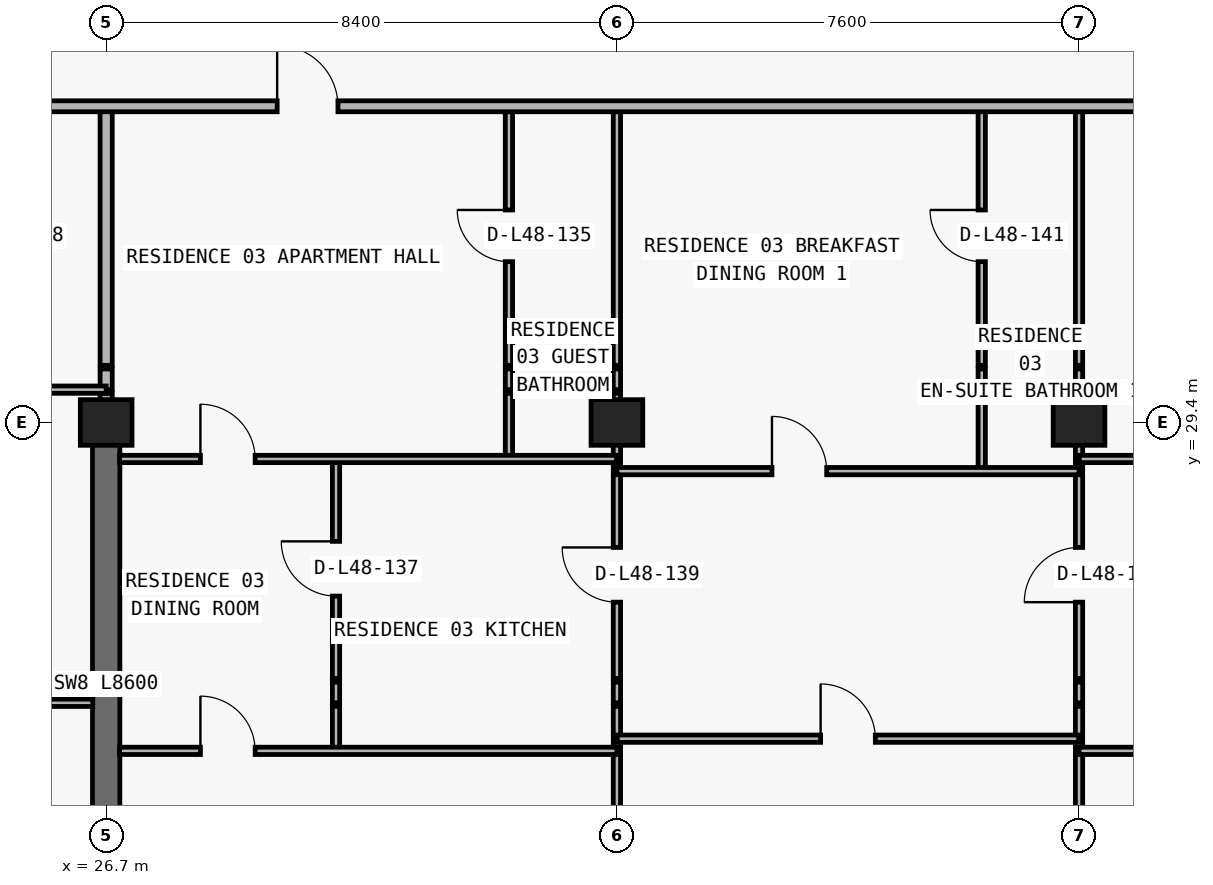
"""IFC4 building model, lengths in metres.
Left out: names, types, materials, properties, quantities, classifications, styles, units other than length and angle.
Written with IfcOpenShell. Run it as: python <this file> out.ifc"""

import sys

from ifc_helpers import new_model, si_unit, direction, frame, frame_2d, origin, origin_2d, place, context, subcontext, project, spatial, rectangle, extrude, element, fill, save


model = new_model("IFC4")
c1 = context("Model", 3, precision=1e-05, world=origin(), true_north=direction((0.0, 1.0)))
c2 = subcontext(c1, "Body", "Model", "MODEL_VIEW")
j1 = project(units=[si_unit("LENGTHUNIT", "METRE"), si_unit("PLANEANGLEUNIT", "RADIAN")], contexts=[c1])
p1 = place(None, origin())
s1 = spatial("IfcSite", under=j1, at=p1, CompositionType="ELEMENT")
p2 = place(p1, origin())
s2 = spatial("IfcBuilding", under=s1, at=p2, CompositionType="ELEMENT")
p3 = place(p2, frame((0.0, 0.0, 173.7)))
s3 = spatial("IfcBuildingStorey", under=s2, at=p3, CompositionType="ELEMENT", Elevation=173.7)
for number, where, z_axis, x_axis in (
    (1, (26.7, 29.4, 0.0), (0.0, 0.0, 1.0), (1.0, 0.0, 0.0)),
    (2, (35.1, 29.4, 0.0), (0.0, 0.0, 1.0), (1.0, 0.0, 0.0)),
    (3, (42.7, 29.4, 0.0), (0.0, 0.0, 1.0), (1.0, 0.0, 0.0)),
):
    element("IfcColumn", number, at=place(p3, frame(where, z_axis=z_axis, x_axis=x_axis)), inside=s3, PredefinedType="COLUMN", context=c2, shape_type="SweptSolid", body=[
        extrude(rectangle(XDim=0.85, YDim=0.75, at=origin_2d()), origin(), (0.0, 0.0, 1.0), 3.05),
    ])
p4 = place(p3, frame((26.7, 20.8, 0.0), z_axis=(0.0, 0.0, 1.0), x_axis=(0.0, 1.0, 0.0)))
e4 = element("IfcWall", 4, at=p4, inside=s3, PredefinedType="SHEAR", context=c2, shape_type="SweptSolid", body=[
    extrude(rectangle(XDim=8.6, YDim=0.45, at=frame_2d((4.3, 0.0))), origin(), (0.0, 0.0, 1.0), 3.05),
])
p5 = place(p3, frame((26.7, 29.405, 0.0), z_axis=(0.0, 0.0, 1.0), x_axis=(0.0, 1.0, 0.0)))
e5 = element("IfcWall", 5, at=p5, inside=s3, PredefinedType="PARTITIONING", context=c2, shape_type="SweptSolid", body=[
    extrude(rectangle(XDim=0.475, YDim=0.2, at=frame_2d((0.237, 0.0))), origin(), (0.0, 0.0, 1.0), 2.335),
])
p6 = place(p3, frame((26.7, 29.94, 0.0), z_axis=(0.0, 0.0, 1.0), x_axis=(0.0, 1.0, 0.0)))
e6 = element("IfcWall", 6, at=p6, inside=s3, PredefinedType="PARTITIONING", context=c2, shape_type="SweptSolid", body=[
    extrude(rectangle(XDim=0.34, YDim=0.2, at=frame_2d((0.17, 0.0))), origin(), (0.0, 0.0, 1.0), 2.335),
])
p7 = place(p3, frame((26.7, 30.34, 0.0), z_axis=(0.0, 0.0, 1.0), x_axis=(0.0, 1.0, 0.0)))
e7 = element("IfcWall", 7, at=p7, inside=s3, PredefinedType="PARTITIONING", context=c2, shape_type="SweptSolid", body=[
    extrude(rectangle(XDim=4.26, YDim=0.2, at=frame_2d((2.13, 0.0))), origin(), (0.0, 0.0, 1.0), 2.335),
])
p8 = place(p3, frame((30.48, 24.0, 0.0), z_axis=(0.0, 0.0, 1.0), x_axis=(0.0, 1.0, 0.0)))
e8 = element("IfcWall", 8, at=p8, inside=s3, PredefinedType="PARTITIONING", context=c2, shape_type="SweptSolid", body=[
    extrude(rectangle(XDim=0.73, YDim=0.12, at=frame_2d((0.365, 0.0))), origin(), (0.0, 0.0, 1.0), 3.05),
])
p9 = place(p3, frame((30.48, 24.79, 0.0), z_axis=(0.0, 0.0, 1.0), x_axis=(0.0, 1.0, 0.0)))
e9 = element("IfcWall", 9, at=p9, inside=s3, PredefinedType="PARTITIONING", context=c2, shape_type="SweptSolid", body=[
    extrude(rectangle(XDim=0.34, YDim=0.12, at=frame_2d((0.17, 0.0))), origin(), (0.0, 0.0, 1.0), 3.05),
])
p10 = place(p3, frame((30.48, 25.19, 0.0), z_axis=(0.0, 0.0, 1.0), x_axis=(0.0, 1.0, 0.0)))
e10 = element("IfcWall", 10, at=p10, inside=s3, PredefinedType="PARTITIONING", context=c2, shape_type="SweptSolid", body=[
    extrude(rectangle(XDim=3.61, YDim=0.12, at=frame_2d((1.805, 0.0))), origin(), (0.0, 0.0, 1.0), 3.05),
])
p11 = place(p10, frame((1.355, 0.0, 0.0)))
e11 = element("IfcOpeningElement", 11, at=p11, cuts=e10, PredefinedType="OPENING", context=c2, shape_type="SweptSolid", body=[
    extrude(rectangle(XDim=0.9, YDim=2.15, at=frame_2d((0.45, 1.075))), frame((0.0, 0.07, 0.0), z_axis=(0.0, -1.0, 0.0), x_axis=(1.0, 0.0, 0.0)), (0.0, 0.0, 1.0), 0.14),
])
p12 = place(p3, frame((33.324, 28.8, 0.0), z_axis=(0.0, 0.0, 1.0), x_axis=(0.0, 1.0, 0.0)))
e12 = element("IfcWall", 12, at=p12, inside=s3, PredefinedType="PARTITIONING", context=c2, shape_type="SweptSolid", body=[
    extrude(rectangle(XDim=1.08, YDim=0.12, at=frame_2d((0.54, 0.0))), origin(), (0.0, 0.0, 1.0), 3.05),
])
p13 = place(p3, frame((33.324, 29.94, 0.0), z_axis=(0.0, 0.0, 1.0), x_axis=(0.0, 1.0, 0.0)))
e13 = element("IfcWall", 13, at=p13, inside=s3, PredefinedType="PARTITIONING", context=c2, shape_type="SweptSolid", body=[
    extrude(rectangle(XDim=0.34, YDim=0.12, at=frame_2d((0.17, 0.0))), origin(), (0.0, 0.0, 1.0), 3.05),
])
p14 = place(p3, frame((33.324, 30.34, 0.0), z_axis=(0.0, 0.0, 1.0), x_axis=(0.0, 1.0, 0.0)))
e14 = element("IfcWall", 14, at=p14, inside=s3, PredefinedType="PARTITIONING", context=c2, shape_type="SweptSolid", body=[
    extrude(rectangle(XDim=4.26, YDim=0.12, at=frame_2d((2.13, 0.0))), origin(), (0.0, 0.0, 1.0), 3.05),
])
p15 = place(p14, frame((1.705, 0.0, 0.0)))
e15 = element("IfcOpeningElement", 15, at=p15, cuts=e14, PredefinedType="OPENING", context=c2, shape_type="SweptSolid", body=[
    extrude(rectangle(XDim=0.85, YDim=2.1, at=frame_2d((0.425, 1.05))), frame((0.0, 0.07, 0.0), z_axis=(0.0, -1.0, 0.0), x_axis=(1.0, 0.0, 0.0)), (0.0, 0.0, 1.0), 0.14),
])
p16 = place(p3, frame((35.1, 11.24, 0.0), z_axis=(0.0, 0.0, 1.0), x_axis=(0.0, 1.0, 0.0)))
e16 = element("IfcWall", 16, at=p16, inside=s3, PredefinedType="PARTITIONING", context=c2, shape_type="SweptSolid", body=[
    extrude(rectangle(XDim=13.49, YDim=0.12, at=frame_2d((6.745, 0.0))), origin(), (0.0, 0.0, 1.0), 2.263),
])
p17 = place(p3, frame((35.1, 24.79, 0.0), z_axis=(0.0, 0.0, 1.0), x_axis=(0.0, 1.0, 0.0)))
e17 = element("IfcWall", 17, at=p17, inside=s3, PredefinedType="PARTITIONING", context=c2, shape_type="SweptSolid", body=[
    extrude(rectangle(XDim=0.34, YDim=0.12, at=frame_2d((0.17, 0.0))), origin(), (0.0, 0.0, 1.0), 2.263),
])
p18 = place(p3, frame((35.1, 25.19, 0.0), z_axis=(0.0, 0.0, 1.0), x_axis=(0.0, 1.0, 0.0)))
e18 = element("IfcWall", 18, at=p18, inside=s3, PredefinedType="PARTITIONING", context=c2, shape_type="SweptSolid", body=[
    extrude(rectangle(XDim=4.69, YDim=0.12, at=frame_2d((2.345, 0.0))), origin(), (0.0, 0.0, 1.0), 2.263),
])
p19 = place(p18, frame((1.255, 0.0, 0.0)))
e19 = element("IfcOpeningElement", 19, at=p19, cuts=e18, PredefinedType="OPENING", context=c2, shape_type="SweptSolid", body=[
    extrude(rectangle(XDim=0.9, YDim=2.15, at=frame_2d((0.45, 1.075))), frame((0.0, 0.07, 0.0), z_axis=(0.0, -1.0, 0.0), x_axis=(1.0, 0.0, 0.0)), (0.0, 0.0, 1.0), 0.14),
])
p20 = place(p3, frame((35.1, 29.94, 0.0), z_axis=(0.0, 0.0, 1.0), x_axis=(0.0, 1.0, 0.0)))
e20 = element("IfcWall", 20, at=p20, inside=s3, PredefinedType="PARTITIONING", context=c2, shape_type="SweptSolid", body=[
    extrude(rectangle(XDim=0.34, YDim=0.12, at=frame_2d((0.17, 0.0))), origin(), (0.0, 0.0, 1.0), 2.263),
])
p21 = place(p3, frame((35.1, 30.34, 0.0), z_axis=(0.0, 0.0, 1.0), x_axis=(0.0, 1.0, 0.0)))
e21 = element("IfcWall", 21, at=p21, inside=s3, PredefinedType="PARTITIONING", context=c2, shape_type="SweptSolid", body=[
    extrude(rectangle(XDim=4.26, YDim=0.12, at=frame_2d((2.13, 0.0))), origin(), (0.0, 0.0, 1.0), 2.263),
])
p22 = place(p3, frame((41.1, 28.6, 0.0), z_axis=(0.0, 0.0, 1.0), x_axis=(0.0, 1.0, 0.0)))
e22 = element("IfcWall", 22, at=p22, inside=s3, PredefinedType="PARTITIONING", context=c2, shape_type="SweptSolid", body=[
    extrude(rectangle(XDim=1.28, YDim=0.12, at=frame_2d((0.64, 0.0))), origin(), (0.0, 0.0, 1.0), 3.05),
])
p23 = place(p3, frame((41.1, 29.94, 0.0), z_axis=(0.0, 0.0, 1.0), x_axis=(0.0, 1.0, 0.0)))
e23 = element("IfcWall", 23, at=p23, inside=s3, PredefinedType="PARTITIONING", context=c2, shape_type="SweptSolid", body=[
    extrude(rectangle(XDim=0.34, YDim=0.12, at=frame_2d((0.17, 0.0))), origin(), (0.0, 0.0, 1.0), 3.05),
])
p24 = place(p3, frame((41.1, 30.34, 0.0), z_axis=(0.0, 0.0, 1.0), x_axis=(0.0, 1.0, 0.0)))
e24 = element("IfcWall", 24, at=p24, inside=s3, PredefinedType="PARTITIONING", context=c2, shape_type="SweptSolid", body=[
    extrude(rectangle(XDim=4.26, YDim=0.12, at=frame_2d((2.13, 0.0))), origin(), (0.0, 0.0, 1.0), 3.05),
])
p25 = place(p24, frame((1.705, 0.0, 0.0)))
e25 = element("IfcOpeningElement", 25, at=p25, cuts=e24, PredefinedType="OPENING", context=c2, shape_type="SweptSolid", body=[
    extrude(rectangle(XDim=0.85, YDim=2.1, at=frame_2d((0.425, 1.05))), frame((0.0, 0.07, 0.0), z_axis=(0.0, -1.0, 0.0), x_axis=(1.0, 0.0, 0.0)), (0.0, 0.0, 1.0), 0.14),
])
p26 = place(p3, frame((42.7, 11.24, 0.0), z_axis=(0.0, 0.0, 1.0), x_axis=(0.0, 1.0, 0.0)))
e26 = element("IfcWall", 26, at=p26, inside=s3, PredefinedType="PARTITIONING", context=c2, shape_type="SweptSolid", body=[
    extrude(rectangle(XDim=13.49, YDim=0.12, at=frame_2d((6.745, 0.0))), origin(), (0.0, 0.0, 1.0), 2.263),
])
p27 = place(p3, frame((42.7, 24.79, 0.0), z_axis=(0.0, 0.0, 1.0), x_axis=(0.0, 1.0, 0.0)))
e27 = element("IfcWall", 27, at=p27, inside=s3, PredefinedType="PARTITIONING", context=c2, shape_type="SweptSolid", body=[
    extrude(rectangle(XDim=0.34, YDim=0.12, at=frame_2d((0.17, 0.0))), origin(), (0.0, 0.0, 1.0), 2.263),
])
p28 = place(p3, frame((42.7, 25.19, 0.0), z_axis=(0.0, 0.0, 1.0), x_axis=(0.0, 1.0, 0.0)))
e28 = element("IfcWall", 28, at=p28, inside=s3, PredefinedType="PARTITIONING", context=c2, shape_type="SweptSolid", body=[
    extrude(rectangle(XDim=4.69, YDim=0.12, at=frame_2d((2.345, 0.0))), origin(), (0.0, 0.0, 1.0), 2.263),
])
p29 = place(p28, frame((1.255, 0.0, 0.0)))
e29 = element("IfcOpeningElement", 29, at=p29, cuts=e28, PredefinedType="OPENING", context=c2, shape_type="SweptSolid", body=[
    extrude(rectangle(XDim=0.9, YDim=2.15, at=frame_2d((0.45, 1.075))), frame((0.0, 0.07, 0.0), z_axis=(0.0, -1.0, 0.0), x_axis=(1.0, 0.0, 0.0)), (0.0, 0.0, 1.0), 0.14),
])
p30 = place(p3, frame((42.7, 29.94, 0.0), z_axis=(0.0, 0.0, 1.0), x_axis=(0.0, 1.0, 0.0)))
e30 = element("IfcWall", 30, at=p30, inside=s3, PredefinedType="PARTITIONING", context=c2, shape_type="SweptSolid", body=[
    extrude(rectangle(XDim=0.34, YDim=0.12, at=frame_2d((0.17, 0.0))), origin(), (0.0, 0.0, 1.0), 2.263),
])
p31 = place(p3, frame((42.7, 30.34, 0.0), z_axis=(0.0, 0.0, 1.0), x_axis=(0.0, 1.0, 0.0)))
e31 = element("IfcWall", 31, at=p31, inside=s3, PredefinedType="PARTITIONING", context=c2, shape_type="SweptSolid", body=[
    extrude(rectangle(XDim=4.26, YDim=0.12, at=frame_2d((2.13, 0.0))), origin(), (0.0, 0.0, 1.0), 2.263),
])
p32 = place(p3, frame((26.92, 24.0, 0.0), z_axis=(0.0, 0.0, 1.0), x_axis=(1.0, 0.0, 0.0)))
e32 = element("IfcWall", 32, at=p32, inside=s3, PredefinedType="PARTITIONING", context=c2, shape_type="SweptSolid", body=[
    extrude(rectangle(XDim=8.18, YDim=0.12, at=frame_2d((4.09, 0.0))), origin(), (0.0, 0.0, 1.0), 3.05),
])
p33 = place(p32, frame((1.33, 0.0, 0.0)))
e33 = element("IfcOpeningElement", 33, at=p33, cuts=e32, PredefinedType="OPENING", context=c2, shape_type="SweptSolid", body=[
    extrude(rectangle(XDim=0.9, YDim=2.15, at=frame_2d((0.45, 1.075))), frame((0.0, 0.07, 0.0), z_axis=(0.0, -1.0, 0.0), x_axis=(1.0, 0.0, 0.0)), (0.0, 0.0, 1.0), 0.14),
])
p34 = place(p3, frame((42.7, 24.0, 0.0), z_axis=(0.0, 0.0, 1.0), x_axis=(1.0, 0.0, 0.0)))
e34 = element("IfcWall", 34, at=p34, inside=s3, PredefinedType="PARTITIONING", context=c2, shape_type="SweptSolid", body=[
    extrude(rectangle(XDim=8.18, YDim=0.12, at=frame_2d((4.09, 0.0))), origin(), (0.0, 0.0, 1.0), 3.05),
])
p35 = place(p34, frame((3.64, 0.0, 0.0)))
e35 = element("IfcOpeningElement", 35, at=p35, cuts=e34, PredefinedType="OPENING", context=c2, shape_type="SweptSolid", body=[
    extrude(rectangle(XDim=0.9, YDim=2.15, at=frame_2d((0.45, 1.075))), frame((0.0, 0.07, 0.0), z_axis=(0.0, -1.0, 0.0), x_axis=(1.0, 0.0, 0.0)), (0.0, 0.0, 1.0), 0.14),
])
p36 = place(p3, frame((35.105, 24.2, 0.0), z_axis=(0.0, 0.0, 1.0), x_axis=(1.0, 0.0, 0.0)))
e36 = element("IfcWall", 36, at=p36, inside=s3, PredefinedType="PARTITIONING", context=c2, shape_type="SweptSolid", body=[
    extrude(rectangle(XDim=7.59, YDim=0.12, at=frame_2d((3.795, 0.0))), origin(), (0.0, 0.0, 1.0), 3.05),
])
p37 = place(p36, frame((3.345, 0.0, 0.0)))
e37 = element("IfcOpeningElement", 37, at=p37, cuts=e36, PredefinedType="OPENING", context=c2, shape_type="SweptSolid", body=[
    extrude(rectangle(XDim=0.9, YDim=2.15, at=frame_2d((0.45, 1.075))), frame((0.0, 0.07, 0.0), z_axis=(0.0, -1.0, 0.0), x_axis=(1.0, 0.0, 0.0)), (0.0, 0.0, 1.0), 0.14),
])
p38 = place(p3, frame((18.3, 24.79, 0.0), z_axis=(0.0, 0.0, 1.0), x_axis=(1.0, 0.0, 0.0)))
e38 = element("IfcWall", 38, at=p38, inside=s3, PredefinedType="PARTITIONING", context=c2, shape_type="SweptSolid", body=[
    extrude(rectangle(XDim=8.18, YDim=0.12, at=frame_2d((4.09, 0.0))), origin(), (0.0, 0.0, 1.0), 3.05),
])
p39 = place(p38, frame((1.818, 0.0, 0.0)))
e39 = element("IfcOpeningElement", 39, at=p39, cuts=e38, PredefinedType="OPENING", context=c2, shape_type="SweptSolid", body=[
    extrude(rectangle(XDim=0.9, YDim=2.15, at=frame_2d((0.45, 1.075))), frame((0.0, 0.07, 0.0), z_axis=(0.0, -1.0, 0.0), x_axis=(1.0, 0.0, 0.0)), (0.0, 0.0, 1.0), 0.14),
])
p40 = place(p38, frame((5.95, 0.0, 0.0)))
e40 = element("IfcOpeningElement", 40, at=p40, cuts=e38, PredefinedType="OPENING", context=c2, shape_type="SweptSolid", body=[
    extrude(rectangle(XDim=0.9, YDim=2.15, at=frame_2d((0.45, 1.075))), frame((0.0, 0.07, 0.0), z_axis=(0.0, -1.0, 0.0), x_axis=(1.0, 0.0, 0.0)), (0.0, 0.0, 1.0), 0.14),
])
p41 = place(p3, frame((35.1, 28.6, 0.0), z_axis=(0.0, 0.0, 1.0), x_axis=(1.0, 0.0, 0.0)))
e41 = element("IfcWall", 41, at=p41, inside=s3, PredefinedType="PARTITIONING", context=c2, shape_type="SweptSolid", body=[
    extrude(rectangle(XDim=7.6, YDim=0.12, at=frame_2d((3.8, 0.0))), origin(), (0.0, 0.0, 1.0), 3.05),
])
p42 = place(p41, frame((2.55, 0.0, 0.0)))
e42 = element("IfcOpeningElement", 42, at=p42, cuts=e41, PredefinedType="OPENING", context=c2, shape_type="SweptSolid", body=[
    extrude(rectangle(XDim=0.9, YDim=2.15, at=frame_2d((0.45, 1.075))), frame((0.0, 0.07, 0.0), z_axis=(0.0, -1.0, 0.0), x_axis=(1.0, 0.0, 0.0)), (0.0, 0.0, 1.0), 0.14),
])
p43 = place(p3, frame((26.92, 28.8, 0.0), z_axis=(0.0, 0.0, 1.0), x_axis=(1.0, 0.0, 0.0)))
e43 = element("IfcWall", 43, at=p43, inside=s3, PredefinedType="PARTITIONING", context=c2, shape_type="SweptSolid", body=[
    extrude(rectangle(XDim=8.175, YDim=0.12, at=frame_2d((4.087, 0.0))), origin(), (0.0, 0.0, 1.0), 3.05),
])
p44 = place(p43, frame((1.33, 0.0, 0.0)))
e44 = element("IfcOpeningElement", 44, at=p44, cuts=e43, PredefinedType="OPENING", context=c2, shape_type="SweptSolid", body=[
    extrude(rectangle(XDim=0.9, YDim=2.15, at=frame_2d((0.45, 1.075))), frame((0.0, 0.07, 0.0), z_axis=(0.0, -1.0, 0.0), x_axis=(1.0, 0.0, 0.0)), (0.0, 0.0, 1.0), 0.14),
])
p45 = place(p3, frame((42.705, 28.8, 0.0), z_axis=(0.0, 0.0, 1.0), x_axis=(1.0, 0.0, 0.0)))
e45 = element("IfcWall", 45, at=p45, inside=s3, PredefinedType="PARTITIONING", context=c2, shape_type="SweptSolid", body=[
    extrude(rectangle(XDim=8.175, YDim=0.12, at=frame_2d((4.087, 0.0))), origin(), (0.0, 0.0, 1.0), 3.05),
])
p46 = place(p45, frame((2.877, 0.0, 0.0)))
e46 = element("IfcOpeningElement", 46, at=p46, cuts=e45, PredefinedType="OPENING", context=c2, shape_type="SweptSolid", body=[
    extrude(rectangle(XDim=0.9, YDim=2.15, at=frame_2d((0.45, 1.075))), frame((0.0, 0.07, 0.0), z_axis=(0.0, -1.0, 0.0), x_axis=(1.0, 0.0, 0.0)), (0.0, 0.0, 1.0), 0.14),
])
p47 = place(p3, frame((18.3, 29.94, 0.0), z_axis=(0.0, 0.0, 1.0), x_axis=(1.0, 0.0, 0.0)))
e47 = element("IfcWall", 47, at=p47, inside=s3, PredefinedType="PARTITIONING", context=c2, shape_type="SweptSolid", body=[
    extrude(rectangle(XDim=8.4, YDim=0.12, at=frame_2d((4.2, 0.0))), origin(), (0.0, 0.0, 1.0), 3.05),
])
p48 = place(p47, frame((1.818, 0.0, 0.0)))
e48 = element("IfcOpeningElement", 48, at=p48, cuts=e47, PredefinedType="OPENING", context=c2, shape_type="SweptSolid", body=[
    extrude(rectangle(XDim=0.9, YDim=2.15, at=frame_2d((0.45, 1.075))), frame((0.0, 0.07, 0.0), z_axis=(0.0, -1.0, 0.0), x_axis=(1.0, 0.0, 0.0)), (0.0, 0.0, 1.0), 0.14),
])
p49 = place(p3, frame((18.3, 34.6, 0.0), z_axis=(0.0, 0.0, 1.0), x_axis=(1.0, 0.0, 0.0)))
e49 = element("IfcWall", 49, at=p49, inside=s3, PredefinedType="PARTITIONING", context=c2, shape_type="SweptSolid", body=[
    extrude(rectangle(XDim=41.2, YDim=0.18, at=frame_2d((20.6, 0.0))), origin(), (0.0, 0.0, 1.0), 3.05),
])
p50 = place(p49, frame((2.67, 0.0, 0.0)))
e50 = element("IfcOpeningElement", 50, at=p50, cuts=e49, PredefinedType="OPENING", context=c2, shape_type="SweptSolid", body=[
    extrude(rectangle(XDim=1.0, YDim=2.2, at=frame_2d((0.5, 1.1))), frame((0.0, 0.1, 0.0), z_axis=(0.0, -1.0, 0.0), x_axis=(1.0, 0.0, 0.0)), (0.0, 0.0, 1.0), 0.2),
])
p51 = place(p49, frame((11.212, 0.0, 0.0)))
e51 = element("IfcOpeningElement", 51, at=p51, cuts=e49, PredefinedType="OPENING", context=c2, shape_type="SweptSolid", body=[
    extrude(rectangle(XDim=1.0, YDim=2.2, at=frame_2d((0.5, 1.1))), frame((0.0, 0.1, 0.0), z_axis=(0.0, -1.0, 0.0), x_axis=(1.0, 0.0, 0.0)), (0.0, 0.0, 1.0), 0.2),
])
p52 = place(p49, frame((35.483, 0.0, 0.0)))
e52 = element("IfcOpeningElement", 52, at=p52, cuts=e49, PredefinedType="OPENING", context=c2, shape_type="SweptSolid", body=[
    extrude(rectangle(XDim=1.0, YDim=2.2, at=frame_2d((0.5, 1.1))), frame((0.0, 0.1, 0.0), z_axis=(0.0, -1.0, 0.0), x_axis=(1.0, 0.0, 0.0)), (0.0, 0.0, 1.0), 0.2),
])
p53 = place(p51, origin())
e53 = element("IfcDoor", 53, at=p53, inside=s3, OperationType="SINGLE_SWING_LEFT", PredefinedType="DOOR", context=c2, shape_type="SweptSolid", body=[
    extrude(rectangle(XDim=1.0, YDim=2.2, at=frame_2d((0.5, 1.1))), frame((0.0, 0.025, 0.0), z_axis=(0.0, -1.0, 0.0), x_axis=(1.0, 0.0, 0.0)), (0.0, 0.0, 1.0), 0.05),
])
fill(e51, e53)
p54 = place(p15, origin())
e54 = element("IfcDoor", 54, at=p54, inside=s3, OperationType="SINGLE_SWING_RIGHT", PredefinedType="DOOR", context=c2, shape_type="SweptSolid", body=[
    extrude(rectangle(XDim=0.85, YDim=2.1, at=frame_2d((0.425, 1.05))), frame((0.0, 0.025, 0.0), z_axis=(0.0, -1.0, 0.0), x_axis=(1.0, 0.0, 0.0)), (0.0, 0.0, 1.0), 0.05),
])
fill(e15, e54)
p55 = place(p44, origin())
e55 = element("IfcDoor", 55, at=p55, inside=s3, OperationType="SINGLE_SWING_LEFT", PredefinedType="DOOR", context=c2, shape_type="SweptSolid", body=[
    extrude(rectangle(XDim=0.9, YDim=2.15, at=frame_2d((0.45, 1.075))), frame((0.0, 0.025, 0.0), z_axis=(0.0, -1.0, 0.0), x_axis=(1.0, 0.0, 0.0)), (0.0, 0.0, 1.0), 0.05),
])
fill(e44, e55)
p56 = place(p11, origin())
e56 = element("IfcDoor", 56, at=p56, inside=s3, OperationType="SINGLE_SWING_RIGHT", PredefinedType="DOOR", context=c2, shape_type="SweptSolid", body=[
    extrude(rectangle(XDim=0.9, YDim=2.15, at=frame_2d((0.45, 1.075))), frame((0.0, 0.025, 0.0), z_axis=(0.0, -1.0, 0.0), x_axis=(1.0, 0.0, 0.0)), (0.0, 0.0, 1.0), 0.05),
])
fill(e11, e56)
p57 = place(p33, origin())
e57 = element("IfcDoor", 57, at=p57, inside=s3, OperationType="SINGLE_SWING_LEFT", PredefinedType="DOOR", context=c2, shape_type="SweptSolid", body=[
    extrude(rectangle(XDim=0.9, YDim=2.15, at=frame_2d((0.45, 1.075))), frame((0.0, 0.025, 0.0), z_axis=(0.0, -1.0, 0.0), x_axis=(1.0, 0.0, 0.0)), (0.0, 0.0, 1.0), 0.05),
])
fill(e33, e57)
p58 = place(p19, origin())
e58 = element("IfcDoor", 58, at=p58, inside=s3, OperationType="SINGLE_SWING_RIGHT", PredefinedType="DOOR", context=c2, shape_type="SweptSolid", body=[
    extrude(rectangle(XDim=0.9, YDim=2.15, at=frame_2d((0.45, 1.075))), frame((0.0, 0.025, 0.0), z_axis=(0.0, -1.0, 0.0), x_axis=(1.0, 0.0, 0.0)), (0.0, 0.0, 1.0), 0.05),
])
fill(e19, e58)
p59 = place(p42, origin())
e59 = element("IfcDoor", 59, at=p59, inside=s3, OperationType="SINGLE_SWING_LEFT", PredefinedType="DOOR", context=c2, shape_type="SweptSolid", body=[
    extrude(rectangle(XDim=0.9, YDim=2.15, at=frame_2d((0.45, 1.075))), frame((0.0, 0.025, 0.0), z_axis=(0.0, -1.0, 0.0), x_axis=(1.0, 0.0, 0.0)), (0.0, 0.0, 1.0), 0.05),
])
fill(e42, e59)
p60 = place(p25, origin())
e60 = element("IfcDoor", 60, at=p60, inside=s3, OperationType="SINGLE_SWING_RIGHT", PredefinedType="DOOR", context=c2, shape_type="SweptSolid", body=[
    extrude(rectangle(XDim=0.85, YDim=2.1, at=frame_2d((0.425, 1.05))), frame((0.0, 0.025, 0.0), z_axis=(0.0, -1.0, 0.0), x_axis=(1.0, 0.0, 0.0)), (0.0, 0.0, 1.0), 0.05),
])
fill(e25, e60)
p61 = place(p37, origin())
e61 = element("IfcDoor", 61, at=p61, inside=s3, OperationType="SINGLE_SWING_LEFT", PredefinedType="DOOR", context=c2, shape_type="SweptSolid", body=[
    extrude(rectangle(XDim=0.9, YDim=2.15, at=frame_2d((0.45, 1.075))), frame((0.0, 0.025, 0.0), z_axis=(0.0, -1.0, 0.0), x_axis=(1.0, 0.0, 0.0)), (0.0, 0.0, 1.0), 0.05),
])
fill(e37, e61)
p62 = place(p29, origin())
e62 = element("IfcDoor", 62, at=p62, inside=s3, OperationType="SINGLE_SWING_LEFT", PredefinedType="DOOR", context=c2, shape_type="SweptSolid", body=[
    extrude(rectangle(XDim=0.9, YDim=2.15, at=frame_2d((0.45, 1.075))), frame((0.0, 0.025, 0.0), z_axis=(0.0, -1.0, 0.0), x_axis=(1.0, 0.0, 0.0)), (0.0, 0.0, 1.0), 0.05),
])
fill(e29, e62)
save(model, sys.argv[1])
